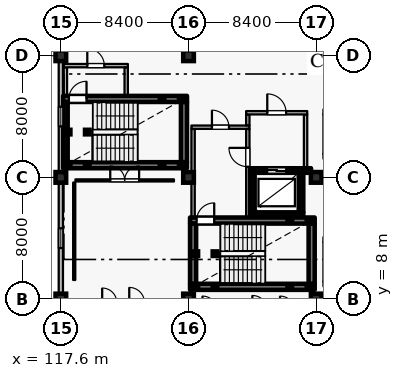
"""IFC4 building model, lengths in metres.
Left out: names, types, materials, properties, quantities, classifications, styles, units other than length and angle.
Written with IfcOpenShell. Run it as: python <this file> out.ifc"""

import sys

from ifc_helpers import new_model, si_unit, direction, frame, frame_2d, origin, origin_2d, place, context, subcontext, project, spatial, rectangle, hollow_rectangle, extrude, element, fill, save


model = new_model("IFC4")
c1 = context("Model", 3, precision=1e-05, world=origin(), true_north=direction((0.0, 1.0)))
c2 = subcontext(c1, "Body", "Model", "MODEL_VIEW")
j1 = project(units=[si_unit("LENGTHUNIT", "METRE"), si_unit("PLANEANGLEUNIT", "RADIAN")], contexts=[c1])
p1 = place(None, origin())
s1 = spatial("IfcSite", under=j1, at=p1, CompositionType="ELEMENT")
p2 = place(p1, origin())
s2 = spatial("IfcBuilding", under=s1, at=p2, CompositionType="ELEMENT")
p3 = place(p2, frame((0.0, 0.0, 28.8)))
s3 = spatial("IfcBuildingStorey", under=s2, at=p3, CompositionType="ELEMENT", Elevation=28.8)
for number, where, z_axis, x_axis in (
    (1, (117.6, 16.0, 0.0), (0.0, 0.0, 1.0), (1.0, 0.0, 0.0)),
    (2, (126.0, 16.0, 0.0), (0.0, 0.0, 1.0), (1.0, 0.0, 0.0)),
    (3, (134.4, 16.0, 0.0), (0.0, 0.0, 1.0), (1.0, 0.0, 0.0)),
    (4, (117.6, 8.0, 0.0), (0.0, 0.0, 1.0), (1.0, 0.0, 0.0)),
    (5, (117.6, 24.0, 0.0), (0.0, 0.0, 1.0), (1.0, 0.0, 0.0)),
    (6, (126.0, 8.0, 0.0), (0.0, 0.0, 1.0), (1.0, 0.0, 0.0)),
    (7, (126.0, 24.0, 0.0), (0.0, 0.0, 1.0), (1.0, 0.0, 0.0)),
    (8, (134.4, 8.0, 0.0), (0.0, 0.0, 1.0), (1.0, 0.0, 0.0)),
    (9, (134.4, 24.0, 0.0), (0.0, 0.0, 1.0), (1.0, 0.0, 0.0)),
):
    element("IfcColumn", number, at=place(p3, frame(where, z_axis=z_axis, x_axis=x_axis)), inside=s3, PredefinedType="COLUMN", context=c2, shape_type="SweptSolid", body=[
        extrude(rectangle(XDim=0.7, YDim=0.7, at=origin_2d()), origin(), (0.0, 0.0, 1.0), 3.6),
    ])
p4 = place(p3, frame((117.6, 8.35, 0.0), z_axis=(0.0, 0.0, 1.0), x_axis=(0.0, 1.0, 0.0)))
e10 = element("IfcWall", 10, at=p4, inside=s3, PredefinedType="SOLIDWALL", context=c2, shape_type="SweptSolid", body=[
    extrude(rectangle(XDim=7.3, YDim=0.28, at=frame_2d((3.65, 0.0))), origin(), (0.0, 0.0, 1.0), 2.7),
])
p5 = place(p4, frame((3.0, 0.0, 0.5)))
e11 = element("IfcOpeningElement", 11, at=p5, cuts=e10, PredefinedType="OPENING", context=c2, shape_type="SweptSolid", body=[
    extrude(rectangle(XDim=1.3, YDim=1.65, at=frame_2d((0.65, 0.825))), frame((0.0, 0.15, 0.0), z_axis=(0.0, -1.0, 0.0), x_axis=(1.0, 0.0, 0.0)), (0.0, 0.0, 1.0), 0.3),
])
p6 = place(p3, frame((117.6, 16.35, 0.0), z_axis=(0.0, 0.0, 1.0), x_axis=(0.0, 1.0, 0.0)))
e12 = element("IfcWall", 12, at=p6, inside=s3, PredefinedType="SOLIDWALL", context=c2, shape_type="SweptSolid", body=[
    extrude(rectangle(XDim=7.3, YDim=0.28, at=frame_2d((3.65, 0.0))), origin(), (0.0, 0.0, 1.0), 2.7),
])
p7 = place(p6, frame((3.0, 0.0, 0.5)))
e13 = element("IfcOpeningElement", 13, at=p7, cuts=e12, PredefinedType="OPENING", context=c2, shape_type="SweptSolid", body=[
    extrude(rectangle(XDim=1.3, YDim=1.65, at=frame_2d((0.65, 0.825))), frame((0.0, 0.15, 0.0), z_axis=(0.0, -1.0, 0.0), x_axis=(1.0, 0.0, 0.0)), (0.0, 0.0, 1.0), 0.3),
])
p8 = place(p3, frame((130.05, 13.55, 0.0), z_axis=(0.0, 0.0, 1.0), x_axis=(1.0, 0.0, 0.0)))
e14 = element("IfcWall", 14, at=p8, inside=s3, PredefinedType="SHEAR", context=c2, shape_type="SweptSolid", body=[
    extrude(rectangle(XDim=3.5, YDim=0.3, at=frame_2d((1.75, 0.0))), origin(), (0.0, 0.0, 1.0), 3.365),
])
p9 = place(p3, frame((133.4, 13.705, 0.0), z_axis=(0.0, 0.0, 1.0), x_axis=(0.0, 1.0, 0.0)))
e15 = element("IfcWall", 15, at=p9, inside=s3, PredefinedType="SHEAR", context=c2, shape_type="SweptSolid", body=[
    extrude(rectangle(XDim=2.59, YDim=0.3, at=frame_2d((1.295, 0.0))), origin(), (0.0, 0.0, 1.0), 3.365),
])
p10 = place(p3, frame((134.06, 16.45, 0.0), z_axis=(0.0, 0.0, 1.0), x_axis=(-1.0, 0.0, 0.0)))
e16 = element("IfcWall", 16, at=p10, inside=s3, PredefinedType="SHEAR", context=c2, shape_type="SweptSolid", body=[
    extrude(rectangle(XDim=4.01, YDim=0.3, at=frame_2d((2.005, 0.0))), origin(), (0.0, 0.0, 1.0), 3.365),
])
p11 = place(p10, frame((1.635, 0.0, 0.0)))
e17 = element("IfcOpeningElement", 17, at=p11, cuts=e16, PredefinedType="OPENING", context=c2, shape_type="SweptSolid", body=[
    extrude(rectangle(XDim=1.25, YDim=2.25, at=frame_2d((0.625, 1.125))), frame((0.0, 0.16, 0.0), z_axis=(0.0, -1.0, 0.0), x_axis=(1.0, 0.0, 0.0)), (0.0, 0.0, 1.0), 0.32),
])
p12 = place(p3, frame((130.2, 16.295, 0.0), z_axis=(0.0, 0.0, 1.0), x_axis=(0.0, -1.0, 0.0)))
e18 = element("IfcWall", 18, at=p12, inside=s3, PredefinedType="SHEAR", context=c2, shape_type="SweptSolid", body=[
    extrude(rectangle(XDim=2.59, YDim=0.3, at=frame_2d((1.295, 0.0))), origin(), (0.0, 0.0, 1.0), 3.365),
])
p13 = place(p3, frame((126.1, 8.8, 0.0), z_axis=(0.0, 0.0, 1.0), x_axis=(1.0, 0.0, 0.0)))
e19 = element("IfcWall", 19, at=p13, inside=s3, PredefinedType="SHEAR", context=c2, shape_type="SweptSolid", body=[
    extrude(rectangle(XDim=8.2, YDim=0.4, at=frame_2d((4.1, 0.0))), origin(), (0.0, 0.0, 1.0), 3.365),
])
p14 = place(p3, frame((134.1, 9.005, 0.0), z_axis=(0.0, 0.0, 1.0), x_axis=(0.0, 1.0, 0.0)))
e20 = element("IfcWall", 20, at=p14, inside=s3, PredefinedType="SHEAR", context=c2, shape_type="SweptSolid", body=[
    extrude(rectangle(XDim=3.95, YDim=0.4, at=frame_2d((1.975, 0.0))), origin(), (0.0, 0.0, 1.0), 3.365),
])
p15 = place(p3, frame((126.1, 13.16, 0.0), z_axis=(0.0, 0.0, 1.0), x_axis=(1.0, 0.0, 0.0)))
e21 = element("IfcWall", 21, at=p15, inside=s3, PredefinedType="SHEAR", context=c2, shape_type="SweptSolid", body=[
    extrude(rectangle(XDim=8.2, YDim=0.4, at=frame_2d((4.1, 0.0))), origin(), (0.0, 0.0, 1.0), 3.365),
])
p16 = place(p15, frame((0.43, 0.0, 0.0)))
e22 = element("IfcOpeningElement", 22, at=p16, cuts=e21, PredefinedType="OPENING", context=c2, shape_type="SweptSolid", body=[
    extrude(rectangle(XDim=1.16, YDim=2.2, at=frame_2d((0.58, 1.1))), frame((0.0, 0.21, 0.0), z_axis=(0.0, -1.0, 0.0), x_axis=(1.0, 0.0, 0.0)), (0.0, 0.0, 1.0), 0.42),
])
p17 = place(p3, frame((126.3, 9.005, 0.0), z_axis=(0.0, 0.0, 1.0), x_axis=(0.0, 1.0, 0.0)))
e23 = element("IfcWall", 23, at=p17, inside=s3, PredefinedType="SHEAR", context=c2, shape_type="SweptSolid", body=[
    extrude(rectangle(XDim=3.95, YDim=0.4, at=frame_2d((1.975, 0.0))), origin(), (0.0, 0.0, 1.0), 3.365),
])
p18 = place(p3, frame((126.3, 13.365, 0.0), z_axis=(0.0, 0.0, 1.0), x_axis=(0.0, 1.0, 0.0)))
e24 = element("IfcWall", 24, at=p18, inside=s3, PredefinedType="PARTITIONING", context=c2, shape_type="SweptSolid", body=[
    extrude(rectangle(XDim=5.82, YDim=0.22, at=frame_2d((2.91, 0.0))), origin(), (0.0, 0.0, 1.0), 3.365),
])
p19 = place(p3, frame((126.19, 19.3, 0.0), z_axis=(0.0, 0.0, 1.0), x_axis=(1.0, 0.0, 0.0)))
e25 = element("IfcWall", 25, at=p19, inside=s3, PredefinedType="PARTITIONING", context=c2, shape_type="SweptSolid", body=[
    extrude(rectangle(XDim=3.82, YDim=0.22, at=frame_2d((1.91, 0.0))), origin(), (0.0, 0.0, 1.0), 3.365),
])
p20 = place(p19, frame((1.35, 0.0, 0.0)))
e26 = element("IfcOpeningElement", 26, at=p20, cuts=e25, PredefinedType="OPENING", context=c2, shape_type="SweptSolid", body=[
    extrude(rectangle(XDim=1.12, YDim=2.2, at=frame_2d((0.56, 1.1))), frame((0.0, 0.12, 0.0), z_axis=(0.0, -1.0, 0.0), x_axis=(1.0, 0.0, 0.0)), (0.0, 0.0, 1.0), 0.24),
])
p21 = place(p3, frame((129.9, 13.365, 0.0), z_axis=(0.0, 0.0, 1.0), x_axis=(0.0, 1.0, 0.0)))
e27 = element("IfcWall", 27, at=p21, inside=s3, PredefinedType="PARTITIONING", context=c2, shape_type="SweptSolid", body=[
    extrude(rectangle(XDim=5.82, YDim=0.22, at=frame_2d((2.91, 0.0))), origin(), (0.0, 0.0, 1.0), 3.365),
])
p22 = place(p21, frame((3.335, 0.0, 0.0)))
e28 = element("IfcOpeningElement", 28, at=p22, cuts=e27, PredefinedType="OPENING", context=c2, shape_type="SweptSolid", body=[
    extrude(rectangle(XDim=1.24, YDim=2.2, at=frame_2d((0.62, 1.1))), frame((0.0, 0.12, 0.0), z_axis=(0.0, -1.0, 0.0), x_axis=(1.0, 0.0, 0.0)), (0.0, 0.0, 1.0), 0.24),
])
p23 = place(p3, frame((129.9, 19.415, 0.0), z_axis=(0.0, 0.0, 1.0), x_axis=(0.0, 1.0, 0.0)))
e29 = element("IfcWall", 29, at=p23, inside=s3, PredefinedType="PARTITIONING", context=c2, shape_type="SweptSolid", body=[
    extrude(rectangle(XDim=0.72, YDim=0.22, at=frame_2d((0.36, 0.0))), origin(), (0.0, 0.0, 1.0), 3.365),
])
p24 = place(p3, frame((133.7, 16.605, 0.0), z_axis=(0.0, 0.0, 1.0), x_axis=(0.0, 1.0, 0.0)))
e30 = element("IfcWall", 30, at=p24, inside=s3, PredefinedType="PARTITIONING", context=c2, shape_type="SweptSolid", body=[
    extrude(rectangle(XDim=3.53, YDim=0.22, at=frame_2d((1.765, 0.0))), origin(), (0.0, 0.0, 1.0), 3.365),
])
p25 = place(p3, frame((129.79, 20.25, 0.0), z_axis=(0.0, 0.0, 1.0), x_axis=(1.0, 0.0, 0.0)))
e31 = element("IfcWall", 31, at=p25, inside=s3, PredefinedType="PARTITIONING", context=c2, shape_type="SweptSolid", body=[
    extrude(rectangle(XDim=4.02, YDim=0.22, at=frame_2d((2.01, 0.0))), origin(), (0.0, 0.0, 1.0), 3.365),
])
p26 = place(p25, frame((1.39, 0.0, 0.0)))
e32 = element("IfcOpeningElement", 32, at=p26, cuts=e31, PredefinedType="OPENING", context=c2, shape_type="SweptSolid", body=[
    extrude(rectangle(XDim=1.24, YDim=2.2, at=frame_2d((0.62, 1.1))), frame((0.0, 0.12, 0.0), z_axis=(0.0, -1.0, 0.0), x_axis=(1.0, 0.0, 0.0)), (0.0, 0.0, 1.0), 0.24),
])
for number, where, z_axis, x_axis in (
    (33, (126.48, 8.8, 0.0), (0.0, 0.0, 1.0), (1.0, 0.0, 0.0)),
    (34, (126.48, 10.98, 0.0), (0.0, 0.0, 1.0), (1.0, 0.0, 0.0)),
    (35, (127.74, 8.8, 0.0), (0.0, 0.0, 1.0), (1.0, 0.0, 0.0)),
    (36, (127.74, 10.98, 0.0), (0.0, 0.0, 1.0), (1.0, 0.0, 0.0)),
    (37, (132.66, 8.8, -1.8), (0.0, 0.0, 1.0), (1.0, 0.0, 0.0)),
    (38, (132.66, 13.16, -1.8), (0.0, 0.0, 1.0), (1.0, 0.0, 0.0)),
    (39, (133.92, 8.8, -1.8), (0.0, 0.0, 1.0), (1.0, 0.0, 0.0)),
    (40, (133.92, 13.16, -1.8), (0.0, 0.0, 1.0), (1.0, 0.0, 0.0)),
):
    element("IfcColumn", number, at=place(p3, frame(where, z_axis=z_axis, x_axis=x_axis)), inside=s3, PredefinedType="COLUMN", context=c2, shape_type="SweptSolid", body=[
        extrude(hollow_rectangle(XDim=0.3, YDim=0.3, WallThickness=0.012, at=origin_2d()), origin(), (0.0, 0.0, 1.0), 3.42),
    ])
p27 = place(p3, frame((117.75, 16.8, 0.0), z_axis=(0.0, 0.0, 1.0), x_axis=(1.0, 0.0, 0.0)))
e41 = element("IfcWall", 41, at=p27, inside=s3, PredefinedType="SHEAR", context=c2, shape_type="SweptSolid", body=[
    extrude(rectangle(XDim=8.15, YDim=0.4, at=frame_2d((4.075, 0.0))), origin(), (0.0, 0.0, 1.0), 3.365),
])
p28 = place(p3, frame((125.7, 17.005, 0.0), z_axis=(0.0, 0.0, 1.0), x_axis=(0.0, 1.0, 0.0)))
e42 = element("IfcWall", 42, at=p28, inside=s3, PredefinedType="SHEAR", context=c2, shape_type="SweptSolid", body=[
    extrude(rectangle(XDim=3.95, YDim=0.4, at=frame_2d((1.975, 0.0))), origin(), (0.0, 0.0, 1.0), 3.365),
])
p29 = place(p3, frame((117.75, 21.16, 0.0), z_axis=(0.0, 0.0, 1.0), x_axis=(1.0, 0.0, 0.0)))
e43 = element("IfcWall", 43, at=p29, inside=s3, PredefinedType="SHEAR", context=c2, shape_type="SweptSolid", body=[
    extrude(rectangle(XDim=8.15, YDim=0.4, at=frame_2d((4.075, 0.0))), origin(), (0.0, 0.0, 1.0), 3.365),
])
p30 = place(p29, frame((0.38, 0.0, 0.0)))
e44 = element("IfcOpeningElement", 44, at=p30, cuts=e43, PredefinedType="OPENING", context=c2, shape_type="SweptSolid", body=[
    extrude(rectangle(XDim=1.16, YDim=2.2, at=frame_2d((0.58, 1.1))), frame((0.0, 0.21, 0.0), z_axis=(0.0, -1.0, 0.0), x_axis=(1.0, 0.0, 0.0)), (0.0, 0.0, 1.0), 0.42),
])
p31 = place(p3, frame((117.9, 17.005, 0.0), z_axis=(0.0, 0.0, 1.0), x_axis=(0.0, 1.0, 0.0)))
e45 = element("IfcWall", 45, at=p31, inside=s3, PredefinedType="SHEAR", context=c2, shape_type="SweptSolid", body=[
    extrude(rectangle(XDim=3.95, YDim=0.3, at=frame_2d((1.975, 0.0))), origin(), (0.0, 0.0, 1.0), 3.365),
])
p32 = place(p3, frame((117.9, 21.365, 0.0), z_axis=(0.0, 0.0, 1.0), x_axis=(0.0, 1.0, 0.0)))
e46 = element("IfcWall", 46, at=p32, inside=s3, PredefinedType="PARTITIONING", context=c2, shape_type="SweptSolid", body=[
    extrude(rectangle(XDim=1.87, YDim=0.22, at=frame_2d((0.935, 0.0))), origin(), (0.0, 0.0, 1.0), 3.365),
])
p33 = place(p3, frame((117.79, 23.35, 0.0), z_axis=(0.0, 0.0, 1.0), x_axis=(1.0, 0.0, 0.0)))
e47 = element("IfcWall", 47, at=p33, inside=s3, PredefinedType="PARTITIONING", context=c2, shape_type="SweptSolid", body=[
    extrude(rectangle(XDim=4.22, YDim=0.22, at=frame_2d((2.11, 0.0))), origin(), (0.0, 0.0, 1.0), 3.365),
])
p34 = place(p33, frame((1.55, 0.0, 0.0)))
e48 = element("IfcOpeningElement", 48, at=p34, cuts=e47, PredefinedType="OPENING", context=c2, shape_type="SweptSolid", body=[
    extrude(rectangle(XDim=1.12, YDim=2.2, at=frame_2d((0.56, 1.1))), frame((0.0, 0.12, 0.0), z_axis=(0.0, -1.0, 0.0), x_axis=(1.0, 0.0, 0.0)), (0.0, 0.0, 1.0), 0.24),
])
p35 = place(p3, frame((121.9, 21.365, 0.0), z_axis=(0.0, 0.0, 1.0), x_axis=(0.0, 1.0, 0.0)))
e49 = element("IfcWall", 49, at=p35, inside=s3, PredefinedType="PARTITIONING", context=c2, shape_type="SweptSolid", body=[
    extrude(rectangle(XDim=1.87, YDim=0.22, at=frame_2d((0.935, 0.0))), origin(), (0.0, 0.0, 1.0), 3.365),
])
for number, where, z_axis, x_axis in (
    (50, (118.08, 16.8, 0.0), (0.0, 0.0, 1.0), (1.0, 0.0, 0.0)),
    (51, (118.08, 18.98, 0.0), (0.0, 0.0, 1.0), (1.0, 0.0, 0.0)),
    (52, (119.34, 16.8, 0.0), (0.0, 0.0, 1.0), (1.0, 0.0, 0.0)),
    (53, (119.34, 18.98, 0.0), (0.0, 0.0, 1.0), (1.0, 0.0, 0.0)),
    (54, (124.26, 16.8, -1.8), (0.0, 0.0, 1.0), (1.0, 0.0, 0.0)),
    (55, (124.26, 21.16, -1.8), (0.0, 0.0, 1.0), (1.0, 0.0, 0.0)),
    (56, (125.52, 16.8, -1.8), (0.0, 0.0, 1.0), (1.0, 0.0, 0.0)),
    (57, (125.52, 21.16, -1.8), (0.0, 0.0, 1.0), (1.0, 0.0, 0.0)),
):
    element("IfcColumn", number, at=place(p3, frame(where, z_axis=z_axis, x_axis=x_axis)), inside=s3, PredefinedType="COLUMN", context=c2, shape_type="SweptSolid", body=[
        extrude(hollow_rectangle(XDim=0.3, YDim=0.3, WallThickness=0.012, at=origin_2d()), origin(), (0.0, 0.0, 1.0), 3.42),
    ])
p36 = place(p3, frame((118.56, 15.8, 0.0), z_axis=(0.0, 0.0, 1.0), x_axis=(1.0, 0.0, 0.0)))
e58 = element("IfcWall", 58, at=p36, inside=s3, PredefinedType="PARTITIONING", context=c2, shape_type="SweptSolid", body=[
    extrude(rectangle(XDim=6.48, YDim=0.14, at=frame_2d((3.24, 0.0))), origin(), (0.0, 0.0, 1.0), 3.365),
])
p37 = place(p36, frame((2.29, 0.0, 0.0)))
e59 = element("IfcOpeningElement", 59, at=p37, cuts=e58, PredefinedType="OPENING", context=c2, shape_type="SweptSolid", body=[
    extrude(rectangle(XDim=1.9, YDim=2.4, at=frame_2d((0.95, 1.2))), frame((0.0, 0.08, 0.0), z_axis=(0.0, -1.0, 0.0), x_axis=(1.0, 0.0, 0.0)), (0.0, 0.0, 1.0), 0.16),
])
p38 = place(p3, frame((118.48, 9.25, 0.0), z_axis=(0.0, 0.0, 1.0), x_axis=(0.0, 1.0, 0.0)))
e60 = element("IfcWall", 60, at=p38, inside=s3, PredefinedType="PARTITIONING", context=c2, shape_type="SweptSolid", body=[
    extrude(rectangle(XDim=6.41, YDim=0.14, at=frame_2d((3.205, 0.0))), origin(), (0.0, 0.0, 1.0), 3.365),
])
p39 = place(p5, origin())
e61 = element("IfcWindow", 61, at=p39, inside=s3, PartitioningType="SINGLE_PANEL", PredefinedType="WINDOW", context=c2, shape_type="SweptSolid", body=[
    extrude(rectangle(XDim=1.3, YDim=1.65, at=frame_2d((0.65, 0.825))), frame((0.0, 0.03, 0.0), z_axis=(0.0, -1.0, 0.0), x_axis=(1.0, 0.0, 0.0)), (0.0, 0.0, 1.0), 0.06),
])
fill(e11, e61)
p40 = place(p7, origin())
e62 = element("IfcWindow", 62, at=p40, inside=s3, PartitioningType="SINGLE_PANEL", PredefinedType="WINDOW", context=c2, shape_type="SweptSolid", body=[
    extrude(rectangle(XDim=1.3, YDim=1.65, at=frame_2d((0.65, 0.825))), frame((0.0, 0.03, 0.0), z_axis=(0.0, -1.0, 0.0), x_axis=(1.0, 0.0, 0.0)), (0.0, 0.0, 1.0), 0.06),
])
fill(e13, e62)
p41 = place(p11, origin())
e63 = element("IfcDoor", 63, at=p41, inside=s3, OperationType="DOUBLE_DOOR_SLIDING", PredefinedType="DOOR", context=c2, shape_type="SweptSolid", body=[
    extrude(rectangle(XDim=1.25, YDim=2.25, at=frame_2d((0.625, 1.125))), frame((0.0, 0.025, 0.0), z_axis=(0.0, -1.0, 0.0), x_axis=(1.0, 0.0, 0.0)), (0.0, 0.0, 1.0), 0.05),
])
fill(e17, e63)
p42 = place(p16, origin())
e64 = element("IfcDoor", 64, at=p42, inside=s3, OperationType="SINGLE_SWING_RIGHT", PredefinedType="DOOR", context=c2, shape_type="SweptSolid", body=[
    extrude(rectangle(XDim=1.16, YDim=2.2, at=frame_2d((0.58, 1.1))), frame((0.0, 0.025, 0.0), z_axis=(0.0, -1.0, 0.0), x_axis=(1.0, 0.0, 0.0)), (0.0, 0.0, 1.0), 0.05),
])
fill(e22, e64)
p43 = place(p20, origin())
e65 = element("IfcDoor", 65, at=p43, inside=s3, OperationType="SINGLE_SWING_LEFT", PredefinedType="DOOR", context=c2, shape_type="SweptSolid", body=[
    extrude(rectangle(XDim=1.12, YDim=2.2, at=frame_2d((0.56, 1.1))), frame((0.0, 0.025, 0.0), z_axis=(0.0, -1.0, 0.0), x_axis=(1.0, 0.0, 0.0)), (0.0, 0.0, 1.0), 0.05),
])
fill(e26, e65)
p44 = place(p22, origin())
e66 = element("IfcDoor", 66, at=p44, inside=s3, OperationType="SINGLE_SWING_RIGHT", PredefinedType="DOOR", context=c2, shape_type="SweptSolid", body=[
    extrude(rectangle(XDim=1.24, YDim=2.2, at=frame_2d((0.62, 1.1))), frame((0.0, 0.025, 0.0), z_axis=(0.0, -1.0, 0.0), x_axis=(1.0, 0.0, 0.0)), (0.0, 0.0, 1.0), 0.05),
])
fill(e28, e66)
p45 = place(p26, origin())
e67 = element("IfcDoor", 67, at=p45, inside=s3, OperationType="SINGLE_SWING_LEFT", PredefinedType="DOOR", context=c2, shape_type="SweptSolid", body=[
    extrude(rectangle(XDim=1.24, YDim=2.2, at=frame_2d((0.62, 1.1))), frame((0.0, 0.025, 0.0), z_axis=(0.0, -1.0, 0.0), x_axis=(1.0, 0.0, 0.0)), (0.0, 0.0, 1.0), 0.05),
])
fill(e32, e67)
p46 = place(p30, origin())
e68 = element("IfcDoor", 68, at=p46, inside=s3, OperationType="SINGLE_SWING_RIGHT", PredefinedType="DOOR", context=c2, shape_type="SweptSolid", body=[
    extrude(rectangle(XDim=1.16, YDim=2.2, at=frame_2d((0.58, 1.1))), frame((0.0, 0.025, 0.0), z_axis=(0.0, -1.0, 0.0), x_axis=(1.0, 0.0, 0.0)), (0.0, 0.0, 1.0), 0.05),
])
fill(e44, e68)
p47 = place(p34, origin())
e69 = element("IfcDoor", 69, at=p47, inside=s3, OperationType="SINGLE_SWING_LEFT", PredefinedType="DOOR", context=c2, shape_type="SweptSolid", body=[
    extrude(rectangle(XDim=1.12, YDim=2.2, at=frame_2d((0.56, 1.1))), frame((0.0, 0.025, 0.0), z_axis=(0.0, -1.0, 0.0), x_axis=(1.0, 0.0, 0.0)), (0.0, 0.0, 1.0), 0.05),
])
fill(e48, e69)
p48 = place(p37, origin())
e70 = element("IfcDoor", 70, at=p48, inside=s3, OperationType="DOUBLE_DOOR_SINGLE_SWING", PredefinedType="DOOR", context=c2, shape_type="SweptSolid", body=[
    extrude(rectangle(XDim=1.9, YDim=2.4, at=frame_2d((0.95, 1.2))), frame((0.0, 0.025, 0.0), z_axis=(0.0, -1.0, 0.0), x_axis=(1.0, 0.0, 0.0)), (0.0, 0.0, 1.0), 0.05),
])
fill(e59, e70)
save(model, sys.argv[1])
